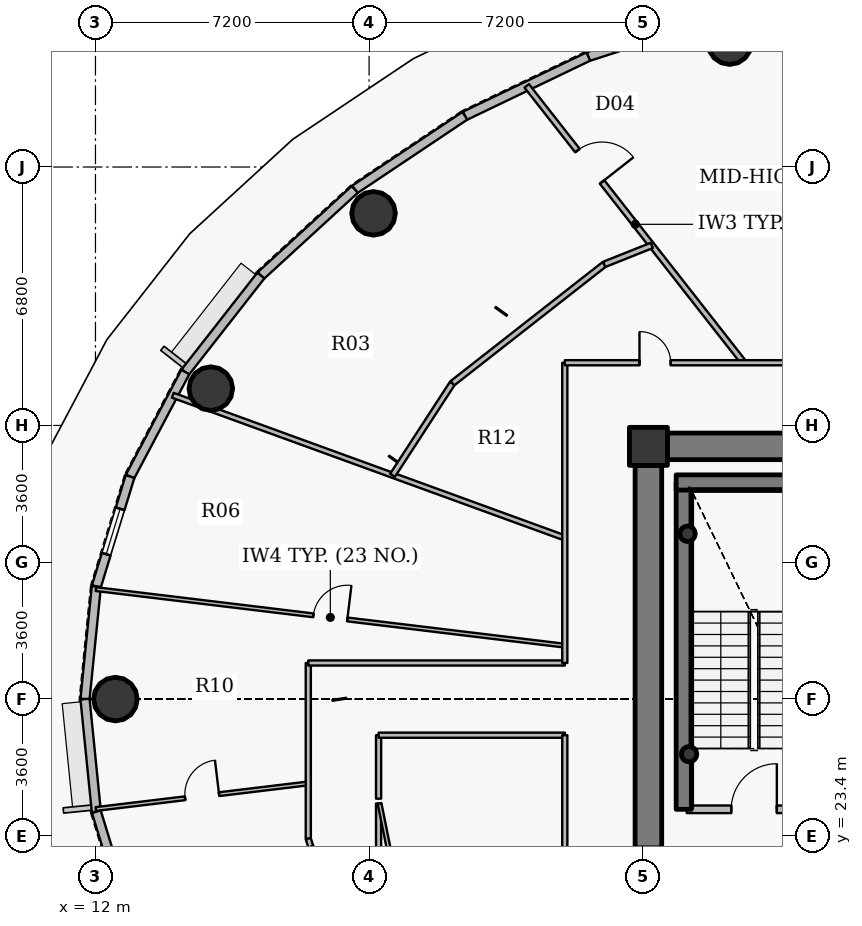
"""IFC4 building model, lengths in metres.
Left out: names, types, materials, properties, quantities, classifications, styles, units other than length and angle.
Written with IfcOpenShell. Run it as: python <this file> out.ifc"""

import sys

from ifc_helpers import new_model, si_unit, direction, frame, frame_2d, origin, origin_2d, place, context, subcontext, project, spatial, rectangle, hollow_circle, extrude, source, transform, mapped, element, fill, save


model = new_model("IFC4")
c1 = context("Model", 3, precision=1e-05, world=origin(), true_north=direction((0.0, 1.0)))
c2 = subcontext(c1, "Body", "Model", "MODEL_VIEW")
j1 = project(units=[si_unit("LENGTHUNIT", "METRE"), si_unit("PLANEANGLEUNIT", "RADIAN")], contexts=[c1])
p1 = place(None, origin())
s1 = spatial("IfcSite", under=j1, at=p1, CompositionType="ELEMENT")
p2 = place(p1, origin())
s2 = spatial("IfcBuilding", under=s1, at=p2, CompositionType="ELEMENT")
p3 = place(p2, frame((0.0, 0.0, 210.3)))
s3 = spatial("IfcBuildingStorey", under=s2, at=p3, CompositionType="ELEMENT", Elevation=210.3)
p4 = place(p3, frame((26.55, 33.65, 0.0), z_axis=(0.0, 0.0, 1.0), x_axis=(1.0, 0.0, 0.0)))
e1 = element("IfcColumn", 1, at=p4, inside=s3, PredefinedType="COLUMN", context=c2, shape_type="SweptSolid", body=[
    extrude(rectangle(XDim=1.0, YDim=1.0, at=origin_2d()), origin(), (0.0, 0.0, 1.0), 3.75),
])
p5 = place(p3, frame((27.48, 24.1, 0.0), z_axis=(0.0, 0.0, 1.0), x_axis=(0.0, 1.0, 0.0)))
e2 = element("IfcWall", 2, at=p5, inside=s3, PredefinedType="SHEAR", context=c2, shape_type="SweptSolid", body=[
    extrude(rectangle(XDim=8.6, YDim=0.4, at=frame_2d((4.3, 0.0))), origin(), (0.0, 0.0, 1.0), 3.75),
])
p6 = place(p3, frame((27.28, 32.7, 0.0), z_axis=(0.0, 0.0, 1.0), x_axis=(1.0, 0.0, 0.0)))
e3 = element("IfcWall", 3, at=p6, inside=s3, PredefinedType="SHEAR", context=c2, shape_type="SweptSolid", body=[
    extrude(rectangle(XDim=4.1, YDim=0.4, at=frame_2d((2.05, 0.0))), origin(), (0.0, 0.0, 1.0), 3.75),
])
for number, where, z_axis, x_axis in (
    (4, (27.58, 31.35, 0.0), (0.0, 0.0, 1.0), (1.0, 0.0, 0.0)),
    (5, (27.62, 25.55, 0.0), (0.0, 0.0, 1.0), (1.0, 0.0, 0.0)),
):
    element("IfcColumn", number, at=place(p3, frame(where, z_axis=z_axis, x_axis=x_axis)), inside=s3, PredefinedType="COLUMN", context=c2, shape_type="SweptSolid", body=[
        extrude(hollow_circle(Radius=0.203, WallThickness=0.016, at=origin_2d()), origin(), (0.0, 0.0, 1.0), 3.75),
    ])
p7 = place(p3, frame((27.05, 33.65, 0.0), z_axis=(0.0, 0.0, 1.0), x_axis=(1.0, 0.0, 0.0)))
e6 = element("IfcWall", 6, at=p7, inside=s3, PredefinedType="SHEAR", context=c2, shape_type="SweptSolid", body=[
    extrude(rectangle(XDim=17.9, YDim=0.7, at=frame_2d((8.95, 0.0))), origin(), (0.0, 0.0, 1.0), 3.05),
])
p8 = place(p7, frame((13.675, 0.0, 0.0)))
e7 = element("IfcOpeningElement", 7, at=p8, cuts=e6, PredefinedType="OPENING", context=c2, shape_type="SweptSolid", body=[
    extrude(rectangle(XDim=1.15, YDim=2.15, at=origin_2d()), frame((0.575, 0.36, 1.075), z_axis=(0.0, -1.0, 0.0), x_axis=(1.0, 0.0, 0.0)), (0.0, 0.0, 1.0), 0.72),
])
p9 = place(p3, frame((26.55, 20.85, 0.0), z_axis=(0.0, 0.0, 1.0), x_axis=(0.0, 1.0, 0.0)))
e8 = element("IfcWall", 8, at=p9, inside=s3, PredefinedType="SHEAR", context=c2, shape_type="SweptSolid", body=[
    extrude(rectangle(XDim=12.3, YDim=0.7, at=frame_2d((6.15, 0.0))), origin(), (0.0, 0.0, 1.0), 3.05),
])
p10 = place(p9, frame((1.085, 0.0, 0.0)))
e9 = element("IfcOpeningElement", 9, at=p10, cuts=e8, PredefinedType="OPENING", context=c2, shape_type="SweptSolid", body=[
    extrude(rectangle(XDim=1.15, YDim=2.15, at=origin_2d()), frame((0.575, 0.36, 1.075), z_axis=(0.0, -1.0, 0.0), x_axis=(1.0, 0.0, 0.0)), (0.0, 0.0, 1.0), 0.72),
])
for number, where, z_axis, x_axis in (
    (10, (28.688, 44.273, -0.25), (0.0, 0.0, 1.0), (1.0, 0.0, 0.0)),
    (11, (19.317, 39.781, -0.25), (0.0, 0.0, 1.0), (1.0, 0.0, 0.0)),
    (12, (15.035, 35.169, -0.25), (0.0, 0.0, 1.0), (1.0, 0.0, 0.0)),
    (13, (12.525, 27.0, -0.25), (0.0, 0.0, 1.0), (1.0, 0.0, 0.0)),
):
    element("IfcColumn", number, at=place(p3, frame(where, z_axis=z_axis, x_axis=x_axis)), inside=s3, PredefinedType="COLUMN", context=c2, shape_type="SweptSolid", body=[
        extrude(hollow_circle(Radius=0.575, WallThickness=0.036, at=origin_2d()), origin(), (0.0, 0.0, 1.0), 4.0),
    ])
p11 = place(p3, frame((24.969, 43.906, 0.0), z_axis=(0.0, 0.0, 1.0), x_axis=(0.951210789182, 0.308541787354, 0.0)))
e14 = element("IfcWall", 14, at=p11, inside=s3, PredefinedType="SOLIDWALL", context=c2, shape_type="SweptSolid", body=[
    extrude(rectangle(XDim=3.702, YDim=0.24, at=frame_2d((1.851, 0.0))), origin(), (0.0, 0.0, 1.0), 3.5),
])
p12 = place(p3, frame((21.72, 42.348, 0.0), z_axis=(0.0, 0.0, 1.0), x_axis=(0.901598104751, 0.432574684313, 0.0)))
e15 = element("IfcWall", 15, at=p12, inside=s3, PredefinedType="SOLIDWALL", context=c2, shape_type="SweptSolid", body=[
    extrude(rectangle(XDim=3.604, YDim=0.24, at=frame_2d((1.802, 0.0))), origin(), (0.0, 0.0, 1.0), 3.5),
])
p13 = place(p3, frame((18.824, 40.411, 0.0), z_axis=(0.0, 0.0, 1.0), x_axis=(0.831262496074, 0.555880079352, 0.0)))
e16 = element("IfcWall", 16, at=p13, inside=s3, PredefinedType="SOLIDWALL", context=c2, shape_type="SweptSolid", body=[
    extrude(rectangle(XDim=3.484, YDim=0.24, at=frame_2d((1.742, 0.0))), origin(), (0.0, 0.0, 1.0), 3.5),
])
p14 = place(p3, frame((16.352, 38.145, 0.0), z_axis=(0.0, 0.0, 1.0), x_axis=(0.737123922599, 0.675757591694, 0.0)))
e17 = element("IfcWall", 17, at=p14, inside=s3, PredefinedType="SOLIDWALL", context=c2, shape_type="SweptSolid", body=[
    extrude(rectangle(XDim=3.354, YDim=0.24, at=frame_2d((1.677, 0.0))), origin(), (0.0, 0.0, 1.0), 3.5),
])
p15 = place(p3, frame((14.364, 35.605, 0.0), z_axis=(0.0, 0.0, 1.0), x_axis=(0.616312344705, 0.787501805562, 0.0)))
e18 = element("IfcWall", 18, at=p15, inside=s3, PredefinedType="SOLIDWALL", context=c2, shape_type="SweptSolid", body=[
    extrude(rectangle(XDim=3.225, YDim=0.24, at=frame_2d((1.612, 0.0))), origin(), (0.0, 0.0, 1.0), 3.5),
])
p16 = place(p3, frame((12.91, 32.856, 0.0), z_axis=(0.0, 0.0, 1.0), x_axis=(0.46766049993, 0.883908172157, 0.0)))
e19 = element("IfcWall", 19, at=p16, inside=s3, PredefinedType="SOLIDWALL", context=c2, shape_type="SweptSolid", body=[
    extrude(rectangle(XDim=3.11, YDim=0.24, at=frame_2d((1.555, 0.0))), origin(), (0.0, 0.0, 1.0), 3.5),
])
p17 = place(p3, frame((12.023, 29.964, 0.0), z_axis=(0.0, 0.0, 1.0), x_axis=(0.293132907334, 0.95607170162, 0.0)))
e20 = element("IfcWall", 20, at=p17, inside=s3, PredefinedType="SOLIDWALL", context=c2, shape_type="SweptSolid", body=[
    extrude(rectangle(XDim=3.025, YDim=0.24, at=frame_2d((1.512, 0.0))), origin(), (0.0, 0.0, 1.0), 3.5),
])
p18 = place(p17, frame((0.887, 0.0, 0.9)))
e21 = element("IfcOpeningElement", 21, at=p18, cuts=e20, PredefinedType="OPENING", context=c2, shape_type="SweptSolid", body=[
    extrude(rectangle(XDim=1.25, YDim=1.65, at=origin_2d()), frame((0.625, 0.13, 0.825), z_axis=(0.0, -1.0, 0.0), x_axis=(1.0, 0.0, 0.0)), (0.0, 0.0, 1.0), 0.26),
])
for number, where, z_axis, x_axis in (
    (22, (11.725, 27.0, 0.0), (0.0, 0.0, 1.0), (0.1, 0.995, 0.0)),
    (23, (12.023, 24.036, 0.0), (0.0, 0.0, 1.0), (-0.1, 0.995, 0.0)),
):
    element("IfcWall", number, at=place(p3, frame(where, z_axis=z_axis, x_axis=x_axis)), inside=s3, PredefinedType="SOLIDWALL", context=c2, shape_type="SweptSolid", body=[
        extrude(rectangle(XDim=2.979, YDim=0.24, at=frame_2d((1.489, 0.0))), origin(), (0.0, 0.0, 1.0), 3.5),
    ])
p19 = place(p3, frame((12.91, 21.144, 0.0), z_axis=(0.0, 0.0, 1.0), x_axis=(-0.293132907334, 0.95607170162, 0.0)))
e24 = element("IfcWall", 24, at=p19, inside=s3, PredefinedType="SOLIDWALL", context=c2, shape_type="SweptSolid", body=[
    extrude(rectangle(XDim=3.025, YDim=0.24, at=frame_2d((1.512, 0.0))), origin(), (0.0, 0.0, 1.0), 3.5),
])
p20 = place(p3, frame((12.011, 24.108, 0.0), z_axis=(0.0, 0.0, 1.0), x_axis=(0.992811436018, 0.119688982415, 0.0)))
e25 = element("IfcWall", 25, at=p20, inside=s3, PredefinedType="PARTITIONING", context=c2, shape_type="SweptSolid", body=[
    extrude(rectangle(XDim=5.63, YDim=0.1, at=frame_2d((2.815, 0.0))), origin(), (0.0, 0.0, 1.0), 2.985),
])
p21 = place(p20, frame((2.365, 0.0, 0.0)))
e26 = element("IfcOpeningElement", 26, at=p21, cuts=e25, PredefinedType="OPENING", context=c2, shape_type="SweptSolid", body=[
    extrude(rectangle(XDim=0.9, YDim=2.1, at=origin_2d()), frame((0.45, 0.06, 1.05), z_axis=(0.0, -1.0, 0.0), x_axis=(1.0, 0.0, 0.0)), (0.0, 0.0, 1.0), 0.12),
])
p22 = place(p3, frame((12.011, 29.894, 0.0), z_axis=(0.0, 0.0, 1.0), x_axis=(0.992802097996, -0.119766415217, 0.0)))
e27 = element("IfcWall", 27, at=p22, inside=s3, PredefinedType="PARTITIONING", context=c2, shape_type="SweptSolid", body=[
    extrude(rectangle(XDim=12.428, YDim=0.1, at=frame_2d((6.214, 0.0))), origin(), (0.0, 0.0, 1.0), 2.985),
])
p23 = place(p22, frame((5.764, 0.0, 0.0)))
e28 = element("IfcOpeningElement", 28, at=p23, cuts=e27, PredefinedType="OPENING", context=c2, shape_type="SweptSolid", body=[
    extrude(rectangle(XDim=0.9, YDim=2.1, at=origin_2d()), frame((0.45, 0.06, 1.05), z_axis=(0.0, -1.0, 0.0), x_axis=(1.0, 0.0, 0.0)), (0.0, 0.0, 1.0), 0.12),
])
p24 = place(p3, frame((14.035, 34.994, 0.0), z_axis=(0.0, 0.0, 1.0), x_axis=(0.939692724134, -0.342019859378, 0.0)))
e29 = element("IfcWall", 29, at=p24, inside=s3, PredefinedType="PARTITIONING", context=c2, shape_type="SweptSolid", body=[
    extrude(rectangle(XDim=10.976, YDim=0.135, at=frame_2d((5.488, 0.0))), origin(), (0.0, 0.0, 1.0), 2.985),
])
p25 = place(p3, frame((17.6, 23.328, 0.0), z_axis=(0.0, 0.0, 1.0), x_axis=(0.0, 1.0, 0.0)))
e30 = element("IfcWall", 30, at=p25, inside=s3, PredefinedType="PARTITIONING", context=c2, shape_type="SweptSolid", body=[
    extrude(rectangle(XDim=4.622, YDim=0.135, at=frame_2d((2.311, 0.0))), origin(), (0.0, 0.0, 1.0), 2.935),
])
p26 = place(p3, frame((17.6, 23.328, 0.0), z_axis=(0.0, 0.0, 1.0), x_axis=(0.292875000845, -0.956150738053, 0.0)))
e31 = element("IfcWall", 31, at=p26, inside=s3, PredefinedType="PARTITIONING", context=c2, shape_type="SweptSolid", body=[
    extrude(rectangle(XDim=0.227, YDim=0.135, at=frame_2d((0.113, 0.0))), origin(), (0.0, 0.0, 1.0), 3.5),
])
p27 = place(p3, frame((17.6, 27.95, 0.0), z_axis=(0.0, 0.0, 1.0), x_axis=(1.0, 0.0, 0.0)))
e32 = element("IfcWall", 32, at=p27, inside=s3, PredefinedType="PARTITIONING", context=c2, shape_type="SweptSolid", body=[
    extrude(rectangle(XDim=6.75, YDim=0.135, at=frame_2d((3.375, 0.0))), origin(), (0.0, 0.0, 1.0), 3.5),
])
p28 = place(p3, frame((17.667, 23.111, 0.0), z_axis=(0.0, 0.0, 1.0), x_axis=(0.467675622269, -0.883900171024, 0.0)))
e33 = element("IfcWall", 33, at=p28, inside=s3, PredefinedType="PARTITIONING", context=c2, shape_type="SweptSolid", body=[
    extrude(rectangle(XDim=2.168, YDim=0.135, at=frame_2d((1.084, 0.0))), origin(), (0.0, 0.0, 1.0), 2.935),
])
p29 = place(p3, frame((19.45, 20.211, 0.0), z_axis=(0.0, 0.0, 1.0), x_axis=(0.0, 1.0, 0.0)))
e34 = element("IfcWall", 34, at=p29, inside=s3, PredefinedType="PARTITIONING", context=c2, shape_type="SweptSolid", body=[
    extrude(rectangle(XDim=4.042, YDim=0.135, at=frame_2d((2.021, 0.0))), origin(), (0.0, 0.0, 1.0), 2.935),
])
p30 = place(p3, frame((19.45, 24.38, 0.0), z_axis=(0.0, 0.0, 1.0), x_axis=(0.0, 1.0, 0.0)))
e35 = element("IfcWall", 35, at=p30, inside=s3, PredefinedType="PARTITIONING", context=c2, shape_type="SweptSolid", body=[
    extrude(rectangle(XDim=1.67, YDim=0.135, at=frame_2d((0.835, 0.0))), origin(), (0.0, 0.0, 1.0), 3.5),
])
p31 = place(p3, frame((19.45, 26.05, 0.0), z_axis=(0.0, 0.0, 1.0), x_axis=(1.0, 0.0, 0.0)))
e36 = element("IfcWall", 36, at=p31, inside=s3, PredefinedType="PARTITIONING", context=c2, shape_type="SweptSolid", body=[
    extrude(rectangle(XDim=4.9, YDim=0.135, at=frame_2d((2.45, 0.0))), origin(), (0.0, 0.0, 1.0), 3.5),
])
p32 = place(p3, frame((19.475, 24.256, 0.0), z_axis=(0.0, 0.0, 1.0), x_axis=(0.198203790622, -0.980160832406, 0.0)))
e37 = element("IfcWall", 37, at=p32, inside=s3, PredefinedType="PARTITIONING", context=c2, shape_type="SweptSolid", body=[
    extrude(rectangle(XDim=1.417, YDim=0.1, at=frame_2d((0.708, 0.0))), origin(), (0.0, 0.0, 1.0), 2.935),
])
p33 = place(p3, frame((19.818, 32.89, 0.0), z_axis=(0.0, 0.0, 1.0), x_axis=(0.545416284356, 0.838165303958, 0.0)))
e38 = element("IfcWall", 38, at=p33, inside=s3, PredefinedType="PARTITIONING", context=c2, shape_type="SweptSolid", body=[
    extrude(rectangle(XDim=2.887, YDim=0.15, at=frame_2d((1.444, 0.0))), origin(), (0.0, 0.0, 1.0), 2.935),
])
p34 = place(p3, frame((21.392, 35.31, 0.0), z_axis=(0.0, 0.0, 1.0), x_axis=(0.787342504548, 0.616515839645, 0.0)))
e39 = element("IfcWall", 39, at=p34, inside=s3, PredefinedType="PARTITIONING", context=c2, shape_type="SweptSolid", body=[
    extrude(rectangle(XDim=5.073, YDim=0.15, at=frame_2d((2.537, 0.0))), origin(), (0.0, 0.0, 1.0), 2.935),
])
p35 = place(p3, frame((23.349, 43.135, 0.0), z_axis=(0.0, 0.0, 1.0), x_axis=(0.617036193332, -0.786934772467, 0.0)))
e40 = element("IfcWall", 40, at=p35, inside=s3, PredefinedType="PARTITIONING", context=c2, shape_type="SweptSolid", body=[
    extrude(rectangle(XDim=9.257, YDim=0.15, at=frame_2d((4.628, 0.0))), origin(), (0.0, 0.0, 1.0), 2.985),
])
p36 = place(p35, frame((2.162, 0.0, 0.0)))
e41 = element("IfcOpeningElement", 41, at=p36, cuts=e40, PredefinedType="OPENING", context=c2, shape_type="SweptSolid", body=[
    extrude(rectangle(XDim=1.05, YDim=2.15, at=origin_2d()), frame((0.525, 0.085, 1.075), z_axis=(0.0, -1.0, 0.0), x_axis=(1.0, 0.0, 0.0)), (0.0, 0.0, 1.0), 0.17),
])
p37 = place(p3, frame((24.35, 18.15, 0.0), z_axis=(0.0, 0.0, 1.0), x_axis=(0.0, 1.0, 0.0)))
e42 = element("IfcWall", 42, at=p37, inside=s3, PredefinedType="PARTITIONING", context=c2, shape_type="SweptSolid", body=[
    extrude(rectangle(XDim=7.9, YDim=0.135, at=frame_2d((3.95, 0.0))), origin(), (0.0, 0.0, 1.0), 2.935),
])
p38 = place(p37, frame((3.45, 0.0, 0.0)))
e43 = element("IfcOpeningElement", 43, at=p38, cuts=e42, PredefinedType="OPENING", context=c2, shape_type="SweptSolid", body=[
    extrude(rectangle(XDim=1.0, YDim=2.15, at=origin_2d()), frame((0.5, 0.078, 1.075), z_axis=(0.0, -1.0, 0.0), x_axis=(1.0, 0.0, 0.0)), (0.0, 0.0, 1.0), 0.155),
])
p39 = place(p3, frame((24.35, 27.95, 0.0), z_axis=(0.0, 0.0, 1.0), x_axis=(0.0, 1.0, 0.0)))
e44 = element("IfcWall", 44, at=p39, inside=s3, PredefinedType="PARTITIONING", context=c2, shape_type="SweptSolid", body=[
    extrude(rectangle(XDim=7.9, YDim=0.135, at=frame_2d((3.95, 0.0))), origin(), (0.0, 0.0, 1.0), 2.935),
])
p40 = place(p3, frame((24.35, 35.85, 0.0), z_axis=(0.0, 0.0, 1.0), x_axis=(1.0, 0.0, 0.0)))
e45 = element("IfcWall", 45, at=p40, inside=s3, PredefinedType="PARTITIONING", context=c2, shape_type="SweptSolid", body=[
    extrude(rectangle(XDim=26.218, YDim=0.135, at=frame_2d((13.109, 0.0))), origin(), (0.0, 0.0, 1.0), 2.935),
])
p41 = place(p40, frame((14.919, 0.0, 0.0)))
e46 = element("IfcOpeningElement", 46, at=p41, cuts=e45, PredefinedType="OPENING", context=c2, shape_type="SweptSolid", body=[
    extrude(rectangle(XDim=1.05, YDim=2.15, at=origin_2d()), frame((0.525, 0.078, 1.075), z_axis=(0.0, -1.0, 0.0), x_axis=(1.0, 0.0, 0.0)), (0.0, 0.0, 1.0), 0.155),
])
p42 = place(p40, frame((1.965, 0.0, 0.0)))
e47 = element("IfcOpeningElement", 47, at=p42, cuts=e45, PredefinedType="OPENING", context=c2, shape_type="SweptSolid", body=[
    extrude(rectangle(XDim=0.82, YDim=2.1, at=origin_2d()), frame((0.41, 0.078, 1.05), z_axis=(0.0, -1.0, 0.0), x_axis=(1.0, 0.0, 0.0)), (0.0, 0.0, 1.0), 0.155),
])
p43 = place(p3, frame((25.387, 38.438, 0.0), z_axis=(0.0, 0.0, 1.0), x_axis=(0.928838228923, 0.370485552339, 0.0)))
e48 = element("IfcWall", 48, at=p43, inside=s3, PredefinedType="PARTITIONING", context=c2, shape_type="SweptSolid", body=[
    extrude(rectangle(XDim=1.349, YDim=0.15, at=frame_2d((0.674, 0.0))), origin(), (0.0, 0.0, 1.0), 3.5),
])
p44 = place(p3, frame((27.56, 24.1, 0.0), z_axis=(0.0, 0.0, 1.0), x_axis=(1.0, 0.0, 0.0)))
e49 = element("IfcWall", 49, at=p44, inside=s3, PredefinedType="PARTITIONING", context=c2, shape_type="SweptSolid", body=[
    extrude(rectangle(XDim=3.54, YDim=0.2, at=frame_2d((1.77, 0.0))), origin(), (0.0, 0.0, 1.0), 3.5),
])
p45 = place(p44, frame((1.17, 0.0, 0.0)))
e50 = element("IfcOpeningElement", 50, at=p45, cuts=e49, PredefinedType="OPENING", context=c2, shape_type="SweptSolid", body=[
    extrude(rectangle(XDim=1.2, YDim=2.15, at=origin_2d()), frame((0.6, 0.11, 1.075), z_axis=(0.0, -1.0, 0.0), x_axis=(1.0, 0.0, 0.0)), (0.0, 0.0, 1.0), 0.22),
])
p46 = place(p3, frame((27.04, 34.0, 0.0), z_axis=(0.0, 0.0, 1.0), x_axis=(-1.0, 0.0, 0.0)))
e51 = element("IfcWall", 51, at=p46, inside=s3, PredefinedType="PARTITIONING", context=c2, shape_type="SweptSolid", body=[
    extrude(rectangle(XDim=0.84, YDim=0.135, at=frame_2d((0.42, 0.0))), origin(), (0.0, 0.0, 1.0), 2.935),
])
p47 = place(p3, frame((26.2, 33.692, 0.0), z_axis=(0.0, 0.0, 1.0), x_axis=(0.0, -1.0, 0.0)))
e52 = element("IfcWall", 52, at=p47, inside=s3, PredefinedType="PARTITIONING", context=c2, shape_type="SweptSolid", body=[
    extrude(rectangle(XDim=0.532, YDim=0.135, at=frame_2d((0.266, 0.0))), origin(), (0.0, 0.0, 1.0), 3.5),
])
m1 = source(origin(), c2, "Body", "SweptSolid", [
    extrude(rectangle(XDim=1.25, YDim=1.65, at=origin_2d()), frame((0.625, 0.03, 0.825), z_axis=(0.0, -1.0, 0.0), x_axis=(1.0, 0.0, 0.0)), (0.0, 0.0, 1.0), 0.06),
])
p48 = place(p18, origin())
e53 = element("IfcWindow", 53, at=p48, inside=s3, PartitioningType="SINGLE_PANEL", PredefinedType="WINDOW", context=c2, shape_type="MappedRepresentation", body=[
    mapped(m1, transform((0.0, 0.0, 0.0), x_axis=(1.0, 0.0, 0.0), y_axis=(0.0, 1.0, 0.0), z_axis=(0.0, 0.0, 1.0), scale=1.0)),
])
fill(e21, e53)
m2 = source(origin(), c2, "Body", "SweptSolid", [
    extrude(rectangle(XDim=1.2, YDim=2.15, at=origin_2d()), frame((0.6, 0.025, 1.075), z_axis=(0.0, -1.0, 0.0), x_axis=(1.0, 0.0, 0.0)), (0.0, 0.0, 1.0), 0.05),
])
p49 = place(p45, origin())
e54 = element("IfcDoor", 54, at=p49, inside=s3, OperationType="SINGLE_SWING_RIGHT", PredefinedType="DOOR", context=c2, shape_type="MappedRepresentation", body=[
    mapped(m2, transform((0.0, 0.0, 0.0), x_axis=(1.0, 0.0, 0.0), y_axis=(0.0, 1.0, 0.0), z_axis=(0.0, 0.0, 1.0), scale=1.0)),
])
fill(e50, e54)
m3 = source(origin(), c2, "Body", "SweptSolid", [
    extrude(rectangle(XDim=0.9, YDim=2.1, at=origin_2d()), frame((0.45, 0.025, 1.05), z_axis=(0.0, -1.0, 0.0), x_axis=(1.0, 0.0, 0.0)), (0.0, 0.0, 1.0), 0.05),
])
p50 = place(p21, origin())
e55 = element("IfcDoor", 55, at=p50, inside=s3, OperationType="SINGLE_SWING_RIGHT", PredefinedType="DOOR", context=c2, shape_type="MappedRepresentation", body=[
    mapped(m3, transform((0.0, 0.0, 0.0), x_axis=(1.0, 0.0, 0.0), y_axis=(0.0, 1.0, 0.0), z_axis=(0.0, 0.0, 1.0), scale=1.0)),
])
fill(e26, e55)
p51 = place(p23, origin())
e56 = element("IfcDoor", 56, at=p51, inside=s3, OperationType="SINGLE_SWING_RIGHT", PredefinedType="DOOR", context=c2, shape_type="MappedRepresentation", body=[
    mapped(m3, transform((0.0, 0.0, 0.0), x_axis=(1.0, 0.0, 0.0), y_axis=(0.0, 1.0, 0.0), z_axis=(0.0, 0.0, 1.0), scale=1.0)),
])
fill(e28, e56)
m4 = source(origin(), c2, "Body", "SweptSolid", [
    extrude(rectangle(XDim=0.82, YDim=2.1, at=origin_2d()), frame((0.41, 0.025, 1.05), z_axis=(0.0, -1.0, 0.0), x_axis=(1.0, 0.0, 0.0)), (0.0, 0.0, 1.0), 0.05),
])
p52 = place(p42, origin())
e57 = element("IfcDoor", 57, at=p52, inside=s3, OperationType="SINGLE_SWING_LEFT", PredefinedType="DOOR", context=c2, shape_type="MappedRepresentation", body=[
    mapped(m4, transform((0.0, 0.0, 0.0), x_axis=(1.0, 0.0, 0.0), y_axis=(0.0, 1.0, 0.0), z_axis=(0.0, 0.0, 1.0), scale=1.0)),
])
fill(e47, e57)
m5 = source(origin(), c2, "Body", "SweptSolid", [
    extrude(rectangle(XDim=1.05, YDim=2.15, at=origin_2d()), frame((0.525, 0.025, 1.075), z_axis=(0.0, -1.0, 0.0), x_axis=(1.0, 0.0, 0.0)), (0.0, 0.0, 1.0), 0.05),
])
p53 = place(p36, origin())
e58 = element("IfcDoor", 58, at=p53, inside=s3, OperationType="SINGLE_SWING_RIGHT", PredefinedType="DOOR", context=c2, shape_type="MappedRepresentation", body=[
    mapped(m5, transform((0.0, 0.0, 0.0), x_axis=(1.0, 0.0, 0.0), y_axis=(0.0, 1.0, 0.0), z_axis=(0.0, 0.0, 1.0), scale=1.0)),
])
fill(e41, e58)
save(model, sys.argv[1])
